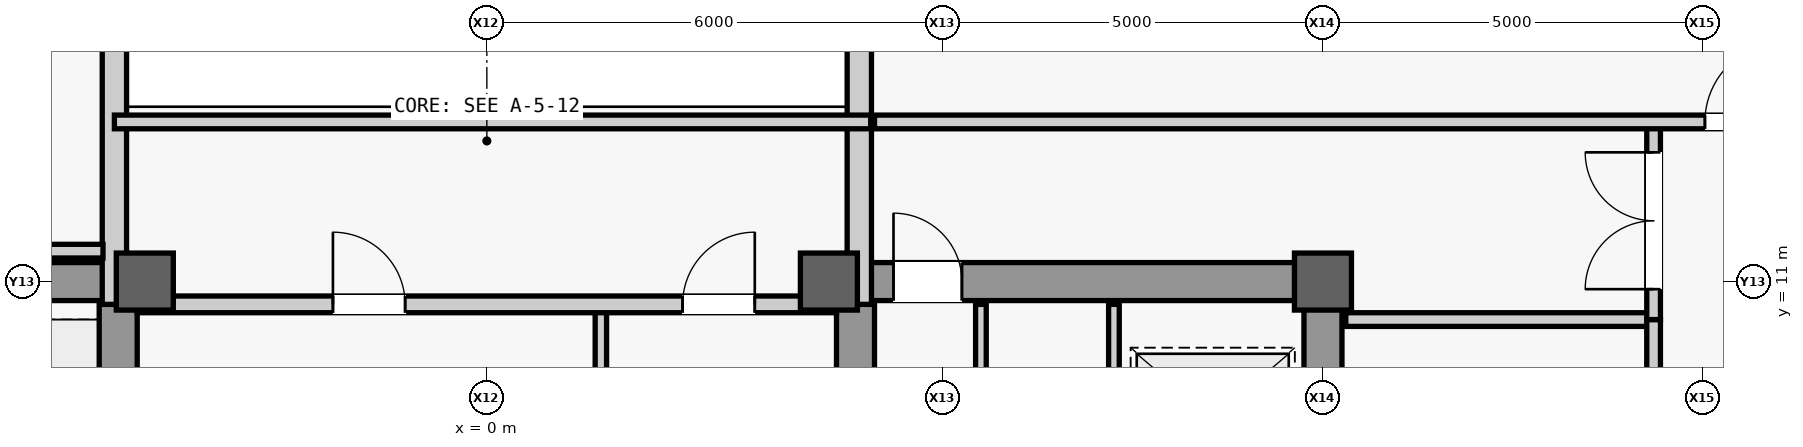
"""IFC4 building model, lengths in metres.
Left out: names, types, materials, properties, quantities, classifications, styles, units other than length and angle.
Written with IfcOpenShell. Run it as: python <this file> out.ifc"""

import sys

from ifc_helpers import new_model, si_unit, direction, frame, frame_2d, origin, origin_2d, place, context, subcontext, project, spatial, rectangle, extrude, source, transform, mapped, element, fill, save


model = new_model("IFC4")
c1 = context("Model", 3, precision=1e-05, world=origin(), true_north=direction((0.0, 1.0)))
c2 = subcontext(c1, "Body", "Model", "MODEL_VIEW")
j1 = project(units=[si_unit("LENGTHUNIT", "METRE"), si_unit("PLANEANGLEUNIT", "RADIAN")], contexts=[c1])
p1 = place(None, origin())
s1 = spatial("IfcSite", under=j1, at=p1, CompositionType="ELEMENT")
p2 = place(p1, origin())
s2 = spatial("IfcBuilding", under=s1, at=p2, CompositionType="ELEMENT")
p3 = place(p2, frame((0.0, 0.0, 354.3)))
s3 = spatial("IfcBuildingStorey", under=s2, at=p3, CompositionType="ELEMENT", Elevation=354.3)
m1 = source(origin(), c2, "Body", "SweptSolid", [
    extrude(rectangle(XDim=22.0, YDim=0.5, at=frame_2d((11.0, 0.0))), origin(), (0.0, 0.0, 1.0), 3.74),
])
p4 = place(p3, frame((11.0, -11.0, 0.0), z_axis=(0.0, 0.0, 1.0), x_axis=(0.0, 1.0, 0.0)))
e1 = element("IfcWall", 1, at=p4, inside=s3, PredefinedType="SHEAR", context=c2, shape_type="MappedRepresentation", body=[
    mapped(m1, transform((0.0, 0.0, 0.0), scale=1.0)),
])
m2 = source(origin(), c2, "Body", "SweptSolid", [
    extrude(rectangle(XDim=1.1, YDim=2.2, at=frame_2d((0.55, 1.1))), frame((0.0, 0.26, 0.0), z_axis=(0.0, -1.0, 0.0), x_axis=(1.0, 0.0, 0.0)), (0.0, 0.0, 1.0), 0.52),
])
p5 = place(p4, frame((0.8, 0.0, 0.0)))
e2 = element("IfcOpeningElement", 2, at=p5, cuts=e1, PredefinedType="OPENING", context=c2, shape_type="MappedRepresentation", body=[
    mapped(m2, transform((0.0, 0.0, 0.0), scale=1.0)),
])
m3 = source(origin(), c2, "Body", "SweptSolid", [
    extrude(rectangle(XDim=0.9, YDim=2.15, at=frame_2d((0.45, 1.075))), frame((0.0, 0.26, 0.0), z_axis=(0.0, -1.0, 0.0), x_axis=(1.0, 0.0, 0.0)), (0.0, 0.0, 1.0), 0.52),
])
p6 = place(p4, frame((7.575, 0.0, 0.0)))
e3 = element("IfcOpeningElement", 3, at=p6, cuts=e1, PredefinedType="OPENING", context=c2, shape_type="MappedRepresentation", body=[
    mapped(m3, transform((0.0, 0.0, 0.0), scale=1.0)),
])
m4 = source(origin(), c2, "Body", "SweptSolid", [
    extrude(rectangle(XDim=1.2, YDim=2.3, at=frame_2d((0.6, 1.15))), frame((0.0, 0.26, 0.0), z_axis=(0.0, -1.0, 0.0), x_axis=(1.0, 0.0, 0.0)), (0.0, 0.0, 1.0), 0.52),
])
p7 = place(p4, frame((17.6, 0.0, 0.0)))
e4 = element("IfcOpeningElement", 4, at=p7, cuts=e1, PredefinedType="OPENING", context=c2, shape_type="MappedRepresentation", body=[
    mapped(m4, transform((0.0, 0.0, 0.0), scale=1.0)),
])
p8 = place(p4, frame((19.6, 0.0, 0.0)))
e5 = element("IfcOpeningElement", 5, at=p8, cuts=e1, PredefinedType="OPENING", context=c2, shape_type="MappedRepresentation", body=[
    mapped(m4, transform((0.0, 0.0, 0.0), scale=1.0)),
])
m5 = source(origin(), c2, "Body", "SweptSolid", [
    extrude(rectangle(XDim=1.3, YDim=2.3, at=frame_2d((0.65, 1.15))), frame((0.0, 0.26, 0.0), z_axis=(0.0, -1.0, 0.0), x_axis=(1.0, 0.0, 0.0)), (0.0, 0.0, 1.0), 0.52),
])
p9 = place(p4, frame((2.7, 0.0, 0.0)))
e6 = element("IfcOpeningElement", 6, at=p9, cuts=e1, PredefinedType="OPENING", context=c2, shape_type="MappedRepresentation", body=[
    mapped(m5, transform((0.0, 0.0, 0.0), scale=1.0)),
])
p10 = place(p4, frame((13.35, 0.0, 0.0)))
e7 = element("IfcOpeningElement", 7, at=p10, cuts=e1, PredefinedType="OPENING", context=c2, shape_type="MappedRepresentation", body=[
    mapped(m5, transform((0.0, 0.0, 0.0), scale=1.0)),
])
m6 = source(origin(), c2, "Body", "SweptSolid", [
    extrude(rectangle(XDim=21.4, YDim=0.5, at=frame_2d((10.7, 0.0))), origin(), (0.0, 0.0, 1.0), 3.74),
])
for number, where, z_axis, x_axis in (
    (8, (-4.85, -10.7, 0.0), (0.0, 0.0, 1.0), (0.0, 1.0, 0.0)),
    (9, (4.85, -10.7, 0.0), (0.0, 0.0, 1.0), (0.0, 1.0, 0.0)),
):
    element("IfcWall", number, at=place(p3, frame(where, z_axis=z_axis, x_axis=x_axis)), inside=s3, PredefinedType="SHEAR", context=c2, shape_type="MappedRepresentation", body=[
        mapped(m6, transform((0.0, 0.0, 0.0), scale=1.0)),
    ])
m7 = source(origin(), c2, "Body", "SweptSolid", [
    extrude(rectangle(XDim=5.9, YDim=0.5, at=frame_2d((2.95, 0.0))), origin(), (0.0, 0.0, 1.0), 3.74),
])
p11 = place(p3, frame((-10.75, 11.0, 0.0), z_axis=(0.0, 0.0, 1.0), x_axis=(1.0, 0.0, 0.0)))
e10 = element("IfcWall", 10, at=p11, inside=s3, PredefinedType="SHEAR", context=c2, shape_type="MappedRepresentation", body=[
    mapped(m7, transform((0.0, 0.0, 0.0), scale=1.0)),
])
p12 = place(p3, frame((4.85, 11.0, 0.0), z_axis=(0.0, 0.0, 1.0), x_axis=(1.0, 0.0, 0.0)))
e11 = element("IfcWall", 11, at=p12, inside=s3, PredefinedType="SHEAR", context=c2, shape_type="MappedRepresentation", body=[
    mapped(m7, transform((0.0, 0.0, 0.0), scale=1.0)),
])
p13 = place(p12, frame((0.5, 0.0, 0.0)))
e12 = element("IfcOpeningElement", 12, at=p13, cuts=e11, PredefinedType="OPENING", context=c2, shape_type="MappedRepresentation", body=[
    mapped(m3, transform((0.0, 0.0, 0.0), scale=1.0)),
])
m8 = source(origin(), c2, "Body", "SweptSolid", [
    extrude(rectangle(XDim=0.75, YDim=0.75, at=origin_2d()), origin(), (0.0, 0.0, 1.0), 4.0),
])
for number, where, z_axis, x_axis in (
    (13, (-4.5, 11.0, 0.0), (0.0, 0.0, 1.0), (1.0, 0.0, 0.0)),
    (14, (4.5, 11.0, 0.0), (0.0, 0.0, 1.0), (1.0, 0.0, 0.0)),
    (15, (11.0, 11.0, 0.0), (0.0, 0.0, 1.0), (1.0, 0.0, 0.0)),
):
    element("IfcColumn", number, at=place(p3, frame(where, z_axis=z_axis, x_axis=x_axis)), inside=s3, PredefinedType="COLUMN", context=c2, shape_type="MappedRepresentation", body=[
        mapped(m8, transform((0.0, 0.0, 0.0), scale=1.0)),
    ])
m9 = source(origin(), c2, "Body", "SweptSolid", [
    extrude(rectangle(XDim=14.98, YDim=0.32, at=frame_2d((7.49, 0.0))), origin(), (0.0, 0.0, 1.0), 3.045),
])
for number, where, z_axis, x_axis in (
    (16, (-4.9, 10.7, 0.0), (0.0, 0.0, 1.0), (0.0, 1.0, 0.0)),
    (17, (4.9, 10.7, 0.0), (0.0, 0.0, 1.0), (0.0, 1.0, 0.0)),
):
    element("IfcWall", number, at=place(p3, frame(where, z_axis=z_axis, x_axis=x_axis)), inside=s3, PredefinedType="STANDARD", context=c2, shape_type="MappedRepresentation", body=[
        mapped(m9, transform((0.0, 0.0, 0.0), scale=1.0)),
    ])
m10 = source(origin(), c2, "Body", "SweptSolid", [
    extrude(rectangle(XDim=9.4, YDim=0.14, at=frame_2d((4.7, 0.0))), origin(), (0.0, 0.0, 1.0), 3.74),
])
p14 = place(p3, frame((8.25, 1.3, 0.0), z_axis=(0.0, 0.0, 1.0), x_axis=(0.0, 1.0, 0.0)))
e18 = element("IfcWall", 18, at=p14, inside=s3, PredefinedType="PARTITIONING", context=c2, shape_type="MappedRepresentation", body=[
    mapped(m10, transform((0.0, 0.0, 0.0), scale=1.0)),
])
m11 = source(origin(), c2, "Body", "SweptSolid", [
    extrude(rectangle(XDim=5.7, YDim=0.14, at=frame_2d((2.85, 0.0))), origin(), (0.0, 0.0, 1.0), 3.74),
])
p15 = place(p3, frame((6.5, 5.0, 0.0), z_axis=(0.0, 0.0, 1.0), x_axis=(0.0, 1.0, 0.0)))
e19 = element("IfcWall", 19, at=p15, inside=s3, PredefinedType="PARTITIONING", context=c2, shape_type="MappedRepresentation", body=[
    mapped(m11, transform((0.0, 0.0, 0.0), scale=1.0)),
])
m12 = source(origin(), c2, "Body", "SweptSolid", [
    extrude(rectangle(XDim=0.9, YDim=2.15, at=frame_2d((0.45, 1.075))), frame((0.0, 0.08, 0.0), z_axis=(0.0, -1.0, 0.0), x_axis=(1.0, 0.0, 0.0)), (0.0, 0.0, 1.0), 0.16),
])
p16 = place(p15, frame((2.05, 0.0, 0.0)))
e20 = element("IfcOpeningElement", 20, at=p16, cuts=e19, PredefinedType="OPENING", context=c2, shape_type="MappedRepresentation", body=[
    mapped(m12, transform((0.0, 0.0, 0.0), scale=1.0)),
])
m13 = source(origin(), c2, "Body", "SweptSolid", [
    extrude(rectangle(XDim=4.05, YDim=0.18, at=frame_2d((2.025, 0.0))), origin(), (0.0, 0.0, 1.0), 3.74),
])
p17 = place(p3, frame((11.3, 10.5, 0.0), z_axis=(0.0, 0.0, 1.0), x_axis=(1.0, 0.0, 0.0)))
e21 = element("IfcWall", 21, at=p17, inside=s3, PredefinedType="PARTITIONING", context=c2, shape_type="MappedRepresentation", body=[
    mapped(m13, transform((0.0, 0.0, 0.0), scale=1.0)),
])
m14 = source(origin(), c2, "Body", "SweptSolid", [
    extrude(rectangle(XDim=16.6, YDim=0.18, at=frame_2d((8.3, 0.0))), origin(), (0.0, 0.0, 1.0), 3.74),
])
p18 = place(p3, frame((15.35, -6.1, 0.0), z_axis=(0.0, 0.0, 1.0), x_axis=(0.0, 1.0, 0.0)))
e22 = element("IfcWall", 22, at=p18, inside=s3, PredefinedType="PARTITIONING", context=c2, shape_type="MappedRepresentation", body=[
    mapped(m14, transform((0.0, 0.0, 0.0), scale=1.0)),
])
m15 = source(origin(), c2, "Body", "SweptSolid", [
    extrude(rectangle(XDim=1.8, YDim=2.25, at=frame_2d((0.9, 1.125))), frame((0.0, 0.1, 0.0), z_axis=(0.0, -1.0, 0.0), x_axis=(1.0, 0.0, 0.0)), (0.0, 0.0, 1.0), 0.2),
])
p19 = place(p18, frame((2.7, 0.0, 0.0)))
e23 = element("IfcOpeningElement", 23, at=p19, cuts=e22, PredefinedType="OPENING", context=c2, shape_type="MappedRepresentation", body=[
    mapped(m15, transform((0.0, 0.0, 0.0), scale=1.0)),
])
p20 = place(p18, frame((13.0, 0.0, 0.0)))
e24 = element("IfcOpeningElement", 24, at=p20, cuts=e22, PredefinedType="OPENING", context=c2, shape_type="MappedRepresentation", body=[
    mapped(m15, transform((0.0, 0.0, 0.0), scale=1.0)),
])
m16 = source(origin(), c2, "Body", "SweptSolid", [
    extrude(rectangle(XDim=5.4, YDim=0.15, at=frame_2d((2.7, 0.0))), origin(), (0.0, 0.0, 1.0), 3.74),
])
p21 = place(p3, frame((1.5, 5.3, 0.0), z_axis=(0.0, 0.0, 1.0), x_axis=(0.0, 1.0, 0.0)))
e25 = element("IfcWall", 25, at=p21, inside=s3, PredefinedType="PARTITIONING", context=c2, shape_type="MappedRepresentation", body=[
    mapped(m16, transform((0.0, 0.0, 0.0), scale=1.0)),
])
m17 = source(origin(), c2, "Body", "SweptSolid", [
    extrude(rectangle(XDim=9.2, YDim=0.22, at=frame_2d((4.6, 0.0))), origin(), (0.0, 0.0, 1.0), 2.79),
])
p22 = place(p3, frame((-4.6, 10.7, 0.0), z_axis=(0.0, 0.0, 1.0), x_axis=(1.0, 0.0, 0.0)))
e26 = element("IfcWall", 26, at=p22, inside=s3, PredefinedType="PARTITIONING", context=c2, shape_type="MappedRepresentation", body=[
    mapped(m17, transform((0.0, 0.0, 0.0), scale=1.0)),
])
m18 = source(origin(), c2, "Body", "SweptSolid", [
    extrude(rectangle(XDim=0.95, YDim=2.15, at=frame_2d((0.475, 1.075))), frame((0.0, 0.12, 0.0), z_axis=(0.0, -1.0, 0.0), x_axis=(1.0, 0.0, 0.0)), (0.0, 0.0, 1.0), 0.24),
])
p23 = place(p22, frame((2.575, 0.0, 0.0)))
e27 = element("IfcOpeningElement", 27, at=p23, cuts=e26, PredefinedType="OPENING", context=c2, shape_type="MappedRepresentation", body=[
    mapped(m18, transform((0.0, 0.0, 0.0), scale=1.0)),
])
p24 = place(p22, frame((7.175, 0.0, 0.0)))
e28 = element("IfcOpeningElement", 28, at=p24, cuts=e26, PredefinedType="OPENING", context=c2, shape_type="MappedRepresentation", body=[
    mapped(m18, transform((0.0, 0.0, 0.0), scale=1.0)),
])
m19 = source(origin(), c2, "Body", "SweptSolid", [
    extrude(rectangle(XDim=9.95, YDim=0.18, at=frame_2d((4.975, 0.0))), origin(), (0.0, 0.0, 1.0), 3.74),
])
p25 = place(p3, frame((-4.9, 13.1, 0.0), z_axis=(0.0, 0.0, 1.0), x_axis=(1.0, 0.0, 0.0)))
e29 = element("IfcWall", 29, at=p25, inside=s3, PredefinedType="PARTITIONING", context=c2, shape_type="MappedRepresentation", body=[
    mapped(m19, transform((0.0, 0.0, 0.0), scale=1.0)),
])
m20 = source(origin(), c2, "Body", "SweptSolid", [
    extrude(rectangle(XDim=2.6, YDim=0.18, at=frame_2d((1.3, 0.0))), origin(), (0.0, 0.0, 1.0), 3.74),
])
p26 = place(p3, frame((15.35, 10.5, 0.0), z_axis=(0.0, 0.0, 1.0), x_axis=(0.0, 1.0, 0.0)))
e30 = element("IfcWall", 30, at=p26, inside=s3, PredefinedType="PARTITIONING", context=c2, shape_type="MappedRepresentation", body=[
    mapped(m20, transform((0.0, 0.0, 0.0), scale=1.0)),
])
p27 = place(p26, frame((0.4, 0.0, 0.0)))
e31 = element("IfcOpeningElement", 31, at=p27, cuts=e30, PredefinedType="OPENING", context=c2, shape_type="MappedRepresentation", body=[
    mapped(m15, transform((0.0, 0.0, 0.0), scale=1.0)),
])
m21 = source(origin(), c2, "Body", "SweptSolid", [
    extrude(rectangle(XDim=12.7, YDim=0.18, at=frame_2d((6.35, 0.0))), origin(), (0.0, 0.0, 1.0), 2.79),
])
p28 = place(p3, frame((-17.75, 11.4, 0.0), z_axis=(0.0, 0.0, 1.0), x_axis=(1.0, 0.0, 0.0)))
e32 = element("IfcWall", 32, at=p28, inside=s3, PredefinedType="PARTITIONING", context=c2, shape_type="MappedRepresentation", body=[
    mapped(m21, transform((0.0, 0.0, 0.0), scale=1.0)),
])
m22 = source(origin(), c2, "Body", "SweptSolid", [
    extrude(rectangle(XDim=1.05, YDim=2.2, at=frame_2d((0.525, 1.1))), frame((0.0, 0.1, 0.0), z_axis=(0.0, -1.0, 0.0), x_axis=(1.0, 0.0, 0.0)), (0.0, 0.0, 1.0), 0.2),
])
p29 = place(p28, frame((0.675, 0.0, 0.0)))
e33 = element("IfcOpeningElement", 33, at=p29, cuts=e32, PredefinedType="OPENING", context=c2, shape_type="MappedRepresentation", body=[
    mapped(m22, transform((0.0, 0.0, 0.0), scale=1.0)),
])
m23 = source(origin(), c2, "Body", "SweptSolid", [
    extrude(rectangle(XDim=12.65, YDim=0.18, at=frame_2d((6.325, 0.0))), origin(), (0.0, 0.0, 1.0), 3.74),
])
p30 = place(p3, frame((5.1, 13.1, 0.0), z_axis=(0.0, 0.0, 1.0), x_axis=(1.0, 0.0, 0.0)))
e34 = element("IfcWall", 34, at=p30, inside=s3, PredefinedType="PARTITIONING", context=c2, shape_type="MappedRepresentation", body=[
    mapped(m23, transform((0.0, 0.0, 0.0), scale=1.0)),
])
p31 = place(p30, frame((10.925, 0.0, 0.0)))
e35 = element("IfcOpeningElement", 35, at=p31, cuts=e34, PredefinedType="OPENING", context=c2, shape_type="MappedRepresentation", body=[
    mapped(m22, transform((0.0, 0.0, 0.0), scale=1.0)),
])
m24 = source(origin(), c2, "Body", "SweptSolid", [
    extrude(rectangle(XDim=0.9, YDim=2.15, at=frame_2d((0.45, 1.075))), frame((0.0, 0.025, 0.0), z_axis=(0.0, -1.0, 0.0), x_axis=(1.0, 0.0, 0.0)), (0.0, 0.0, 1.0), 0.05),
])
p32 = place(p13, origin())
e36 = element("IfcDoor", 36, at=p32, inside=s3, OperationType="SINGLE_SWING_LEFT", PredefinedType="DOOR", context=c2, shape_type="MappedRepresentation", body=[
    mapped(m24, transform((0.0, 0.0, 0.0), scale=1.0)),
])
fill(e12, e36)
m25 = source(origin(), c2, "Body", "SweptSolid", [
    extrude(rectangle(XDim=0.95, YDim=2.15, at=frame_2d((0.475, 1.075))), frame((0.0, 0.025, 0.0), z_axis=(0.0, -1.0, 0.0), x_axis=(1.0, 0.0, 0.0)), (0.0, 0.0, 1.0), 0.05),
])
p33 = place(p23, origin())
e37 = element("IfcDoor", 37, at=p33, inside=s3, OperationType="SINGLE_SWING_LEFT", PredefinedType="DOOR", context=c2, shape_type="MappedRepresentation", body=[
    mapped(m25, transform((0.0, 0.0, 0.0), scale=1.0)),
])
fill(e27, e37)
p34 = place(p24, origin())
e38 = element("IfcDoor", 38, at=p34, inside=s3, OperationType="SINGLE_SWING_RIGHT", PredefinedType="DOOR", context=c2, shape_type="MappedRepresentation", body=[
    mapped(m25, transform((0.0, 0.0, 0.0), scale=1.0)),
])
fill(e28, e38)
m26 = source(origin(), c2, "Body", "SweptSolid", [
    extrude(rectangle(XDim=1.8, YDim=2.25, at=frame_2d((0.9, 1.125))), frame((0.0, 0.025, 0.0), z_axis=(0.0, -1.0, 0.0), x_axis=(1.0, 0.0, 0.0)), (0.0, 0.0, 1.0), 0.05),
])
p35 = place(p27, origin())
e39 = element("IfcDoor", 39, at=p35, inside=s3, OperationType="DOUBLE_DOOR_SINGLE_SWING", PredefinedType="DOOR", context=c2, shape_type="MappedRepresentation", body=[
    mapped(m26, transform((0.0, 0.0, 0.0), scale=1.0)),
])
fill(e31, e39)
m27 = source(origin(), c2, "Body", "SweptSolid", [
    extrude(rectangle(XDim=1.05, YDim=2.2, at=frame_2d((0.525, 1.1))), frame((0.0, 0.025, 0.0), z_axis=(0.0, -1.0, 0.0), x_axis=(1.0, 0.0, 0.0)), (0.0, 0.0, 1.0), 0.05),
])
p36 = place(p31, origin())
e40 = element("IfcDoor", 40, at=p36, inside=s3, OperationType="SINGLE_SWING_RIGHT", PredefinedType="DOOR", context=c2, shape_type="MappedRepresentation", body=[
    mapped(m27, transform((0.0, 0.0, 0.0), scale=1.0)),
])
fill(e35, e40)
save(model, sys.argv[1])
